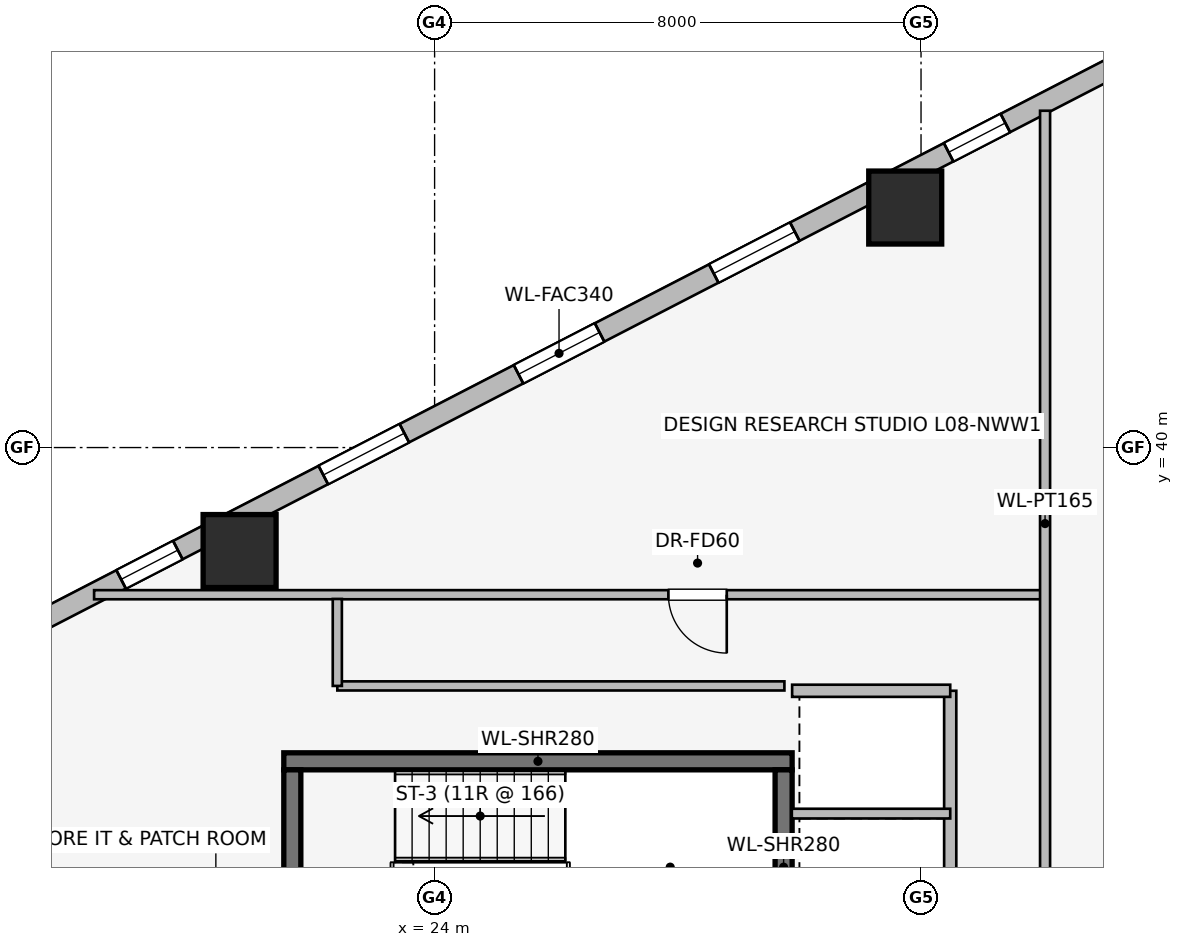
"""IFC4 building model, lengths in metres.
Left out: names, types, materials, properties, quantities, classifications, styles, units other than length and angle.
Written with IfcOpenShell. Run it as: python <this file> out.ifc"""

import sys

from ifc_helpers import new_model, si_unit, direction, frame, frame_2d, origin, origin_2d, place, context, subcontext, project, spatial, rectangle, extrude, element, fill, save


model = new_model("IFC4")
c1 = context("Model", 3, precision=1e-05, world=origin(), true_north=direction((0.0, 1.0)))
c2 = subcontext(c1, "Body", "Model", "MODEL_VIEW")
j1 = project(units=[si_unit("LENGTHUNIT", "METRE"), si_unit("PLANEANGLEUNIT", "RADIAN")], contexts=[c1])
p1 = place(None, origin())
s1 = spatial("IfcSite", under=j1, at=p1, CompositionType="ELEMENT")
p2 = place(p1, origin())
s2 = spatial("IfcBuilding", under=s1, at=p2, CompositionType="ELEMENT")
p3 = place(p2, frame((0.0, 0.0, 34.3)))
s3 = spatial("IfcBuildingStorey", under=s2, at=p3, CompositionType="ELEMENT", Elevation=34.3)
p4 = place(p3, frame((29.88, 34.84, 0.0), z_axis=(0.0, 0.0, 1.0), x_axis=(-1.0, 0.0, 0.0)))
e1 = element("IfcWall", 1, at=p4, inside=s3, PredefinedType="SHEAR", context=c2, shape_type="SweptSolid", body=[
    extrude(rectangle(XDim=8.36, YDim=0.28, at=frame_2d((4.18, 0.0))), origin(), (0.0, 0.0, 1.0), 3.65),
])
for number, where, z_axis, x_axis in (
    (2, (21.66, 34.7, 0.0), (0.0, 0.0, 1.0), (0.0, -1.0, 0.0)),
    (3, (29.74, 31.5, 0.0), (0.0, 0.0, 1.0), (0.0, 1.0, 0.0)),
):
    element("IfcWall", number, at=place(p3, frame(where, z_axis=z_axis, x_axis=x_axis)), inside=s3, PredefinedType="SHEAR", context=c2, shape_type="SweptSolid", body=[
        extrude(rectangle(XDim=3.2, YDim=0.28, at=frame_2d((1.6, 0.0))), origin(), (0.0, 0.0, 1.0), 3.65),
    ])
for number, where, z_axis, x_axis in (
    (4, (31.74, 43.947, 0.0), (0.0, 0.0, 1.0), (1.0, 0.0, 0.0)),
    (5, (20.793, 38.298, 0.0), (0.0, 0.0, 1.0), (1.0, 0.0, 0.0)),
):
    element("IfcColumn", number, at=place(p3, frame(where, z_axis=z_axis, x_axis=x_axis)), inside=s3, PredefinedType="COLUMN", context=c2, shape_type="SweptSolid", body=[
        extrude(rectangle(XDim=1.2, YDim=1.2, at=origin_2d()), origin(), (0.0, 0.0, 1.0), 3.65),
    ])
p5 = place(p3, frame((16.924, 36.841, 0.0), z_axis=(0.0, 0.0, 1.0), x_axis=(0.888634413993, 0.458616264721, 0.0)))
e6 = element("IfcWall", 6, at=p5, inside=s3, PredefinedType="STANDARD", context=c2, shape_type="SweptSolid", body=[
    extrude(rectangle(XDim=20.531, YDim=0.34, at=frame_2d((10.266, 0.0))), origin(), (0.0, 0.0, 1.0), 2.684),
])
p6 = place(p5, frame((2.161, 0.0, 0.75)))
e7 = element("IfcOpeningElement", 7, at=p6, cuts=e6, PredefinedType="OPENING", context=c2, shape_type="SweptSolid", body=[
    extrude(rectangle(XDim=1.05, YDim=1.4, at=frame_2d((0.525, 0.7))), frame((0.0, 0.18, 0.0), z_axis=(0.0, -1.0, 0.0), x_axis=(1.0, 0.0, 0.0)), (0.0, 0.0, 1.0), 0.36),
])
p7 = place(p5, frame((5.903, 0.0, 0.75)))
e8 = element("IfcOpeningElement", 8, at=p7, cuts=e6, PredefinedType="OPENING", context=c2, shape_type="SweptSolid", body=[
    extrude(rectangle(XDim=1.5, YDim=1.5, at=frame_2d((0.75, 0.75))), frame((0.0, 0.18, 0.0), z_axis=(0.0, -1.0, 0.0), x_axis=(1.0, 0.0, 0.0)), (0.0, 0.0, 1.0), 0.36),
])
p8 = place(p5, frame((9.516, 0.0, 0.75)))
e9 = element("IfcOpeningElement", 9, at=p8, cuts=e6, PredefinedType="OPENING", context=c2, shape_type="SweptSolid", body=[
    extrude(rectangle(XDim=1.5, YDim=1.5, at=frame_2d((0.75, 0.75))), frame((0.0, 0.18, 0.0), z_axis=(0.0, -1.0, 0.0), x_axis=(1.0, 0.0, 0.0)), (0.0, 0.0, 1.0), 0.36),
])
p9 = place(p5, frame((13.129, 0.0, 0.75)))
e10 = element("IfcOpeningElement", 10, at=p9, cuts=e6, PredefinedType="OPENING", context=c2, shape_type="SweptSolid", body=[
    extrude(rectangle(XDim=1.5, YDim=1.5, at=frame_2d((0.75, 0.75))), frame((0.0, 0.18, 0.0), z_axis=(0.0, -1.0, 0.0), x_axis=(1.0, 0.0, 0.0)), (0.0, 0.0, 1.0), 0.36),
])
p10 = place(p5, frame((17.476, 0.0, 0.75)))
e11 = element("IfcOpeningElement", 11, at=p10, cuts=e6, PredefinedType="OPENING", context=c2, shape_type="SweptSolid", body=[
    extrude(rectangle(XDim=1.05, YDim=1.4, at=frame_2d((0.525, 0.7))), frame((0.0, 0.18, 0.0), z_axis=(0.0, -1.0, 0.0), x_axis=(1.0, 0.0, 0.0)), (0.0, 0.0, 1.0), 0.36),
])
p11 = place(p3, frame((32.48, 31.95, 0.0), z_axis=(0.0, 0.0, 1.0), x_axis=(0.0, 1.0, 0.0)))
e12 = element("IfcWall", 12, at=p11, inside=s3, PredefinedType="PARTITIONING", context=c2, shape_type="SweptSolid", body=[
    extrude(rectangle(XDim=4.05, YDim=0.2, at=frame_2d((2.025, 0.0))), origin(), (0.0, 0.0, 1.0), 2.513),
])
p12 = place(p3, frame((29.88, 36.0, 0.0), z_axis=(0.0, 0.0, 1.0), x_axis=(1.0, 0.0, 0.0)))
e13 = element("IfcWall", 13, at=p12, inside=s3, PredefinedType="PARTITIONING", context=c2, shape_type="SweptSolid", body=[
    extrude(rectangle(XDim=2.6, YDim=0.2, at=frame_2d((1.3, 0.0))), origin(), (0.0, 0.0, 1.0), 3.39),
])
p13 = place(p3, frame((29.875, 33.98, 0.0), z_axis=(0.0, 0.0, 1.0), x_axis=(1.0, 0.0, 0.0)))
e14 = element("IfcWall", 14, at=p13, inside=s3, PredefinedType="PARTITIONING", context=c2, shape_type="SweptSolid", body=[
    extrude(rectangle(XDim=2.605, YDim=0.16, at=frame_2d((1.302, 0.0))), origin(), (0.0, 0.0, 1.0), 3.39),
])
p14 = place(p3, frame((34.0, 37.58, 0.0), z_axis=(0.0, 0.0, 1.0), x_axis=(-1.0, 0.0, 0.0)))
e15 = element("IfcWall", 15, at=p14, inside=s3, PredefinedType="PARTITIONING", context=c2, shape_type="SweptSolid", body=[
    extrude(rectangle(XDim=15.6, YDim=0.15, at=frame_2d((7.8, 0.0))), origin(), (0.0, 0.0, 1.0), 3.39),
])
p15 = place(p14, frame((5.195, 0.0, 0.0)))
e16 = element("IfcOpeningElement", 16, at=p15, cuts=e15, PredefinedType="OPENING", context=c2, shape_type="SweptSolid", body=[
    extrude(rectangle(XDim=0.96, YDim=2.0, at=frame_2d((0.48, 1.0))), frame((0.0, 0.085, 0.0), z_axis=(0.0, -1.0, 0.0), x_axis=(1.0, 0.0, 0.0)), (0.0, 0.0, 1.0), 0.17),
])
p16 = place(p3, frame((34.04, 31.96, 0.0), z_axis=(0.0, 0.0, 1.0), x_axis=(0.0, 1.0, 0.0)))
e17 = element("IfcWall", 17, at=p16, inside=s3, PredefinedType="PARTITIONING", context=c2, shape_type="SweptSolid", body=[
    extrude(rectangle(XDim=13.579, YDim=0.165, at=frame_2d((6.79, 0.0))), origin(), (0.0, 0.0, 1.0), 3.39),
])
p17 = place(p3, frame((29.753, 36.08, 0.0), z_axis=(0.0, 0.0, 1.0), x_axis=(-1.0, 0.0, 0.0)))
e18 = element("IfcWall", 18, at=p17, inside=s3, PredefinedType="PARTITIONING", context=c2, shape_type="SweptSolid", body=[
    extrude(rectangle(XDim=7.353, YDim=0.15, at=frame_2d((3.677, 0.0))), origin(), (0.0, 0.0, 1.0), 3.39),
])
p18 = place(p3, frame((22.4, 36.08, 0.0), z_axis=(0.0, 0.0, 1.0), x_axis=(0.0, 1.0, 0.0)))
e19 = element("IfcWall", 19, at=p18, inside=s3, PredefinedType="PARTITIONING", context=c2, shape_type="SweptSolid", body=[
    extrude(rectangle(XDim=1.43, YDim=0.15, at=frame_2d((0.715, 0.0))), origin(), (0.0, 0.0, 1.0), 3.39),
])
p19 = place(p6, origin())
e20 = element("IfcWindow", 20, at=p19, inside=s3, PartitioningType="SINGLE_PANEL", PredefinedType="WINDOW", context=c2, shape_type="SweptSolid", body=[
    extrude(rectangle(XDim=1.05, YDim=1.4, at=frame_2d((0.525, 0.7))), frame((0.0, 0.03, 0.0), z_axis=(0.0, -1.0, 0.0), x_axis=(1.0, 0.0, 0.0)), (0.0, 0.0, 1.0), 0.06),
])
fill(e7, e20)
p20 = place(p7, origin())
e21 = element("IfcWindow", 21, at=p20, inside=s3, PartitioningType="SINGLE_PANEL", PredefinedType="WINDOW", context=c2, shape_type="SweptSolid", body=[
    extrude(rectangle(XDim=1.5, YDim=1.5, at=frame_2d((0.75, 0.75))), frame((0.0, 0.03, 0.0), z_axis=(0.0, -1.0, 0.0), x_axis=(1.0, 0.0, 0.0)), (0.0, 0.0, 1.0), 0.06),
])
fill(e8, e21)
p21 = place(p8, origin())
e22 = element("IfcWindow", 22, at=p21, inside=s3, PartitioningType="SINGLE_PANEL", PredefinedType="WINDOW", context=c2, shape_type="SweptSolid", body=[
    extrude(rectangle(XDim=1.5, YDim=1.5, at=frame_2d((0.75, 0.75))), frame((0.0, 0.03, 0.0), z_axis=(0.0, -1.0, 0.0), x_axis=(1.0, 0.0, 0.0)), (0.0, 0.0, 1.0), 0.06),
])
fill(e9, e22)
p22 = place(p9, origin())
e23 = element("IfcWindow", 23, at=p22, inside=s3, PartitioningType="SINGLE_PANEL", PredefinedType="WINDOW", context=c2, shape_type="SweptSolid", body=[
    extrude(rectangle(XDim=1.5, YDim=1.5, at=frame_2d((0.75, 0.75))), frame((0.0, 0.03, 0.0), z_axis=(0.0, -1.0, 0.0), x_axis=(1.0, 0.0, 0.0)), (0.0, 0.0, 1.0), 0.06),
])
fill(e10, e23)
p23 = place(p10, origin())
e24 = element("IfcWindow", 24, at=p23, inside=s3, PartitioningType="SINGLE_PANEL", PredefinedType="WINDOW", context=c2, shape_type="SweptSolid", body=[
    extrude(rectangle(XDim=1.05, YDim=1.4, at=frame_2d((0.525, 0.7))), frame((0.0, 0.03, 0.0), z_axis=(0.0, -1.0, 0.0), x_axis=(1.0, 0.0, 0.0)), (0.0, 0.0, 1.0), 0.06),
])
fill(e11, e24)
p24 = place(p15, origin())
e25 = element("IfcDoor", 25, at=p24, inside=s3, OperationType="SINGLE_SWING_LEFT", PredefinedType="DOOR", context=c2, shape_type="SweptSolid", body=[
    extrude(rectangle(XDim=0.96, YDim=2.0, at=frame_2d((0.48, 1.0))), frame((0.0, 0.025, 0.0), z_axis=(0.0, -1.0, 0.0), x_axis=(1.0, 0.0, 0.0)), (0.0, 0.0, 1.0), 0.05),
])
fill(e16, e25)
save(model, sys.argv[1])
